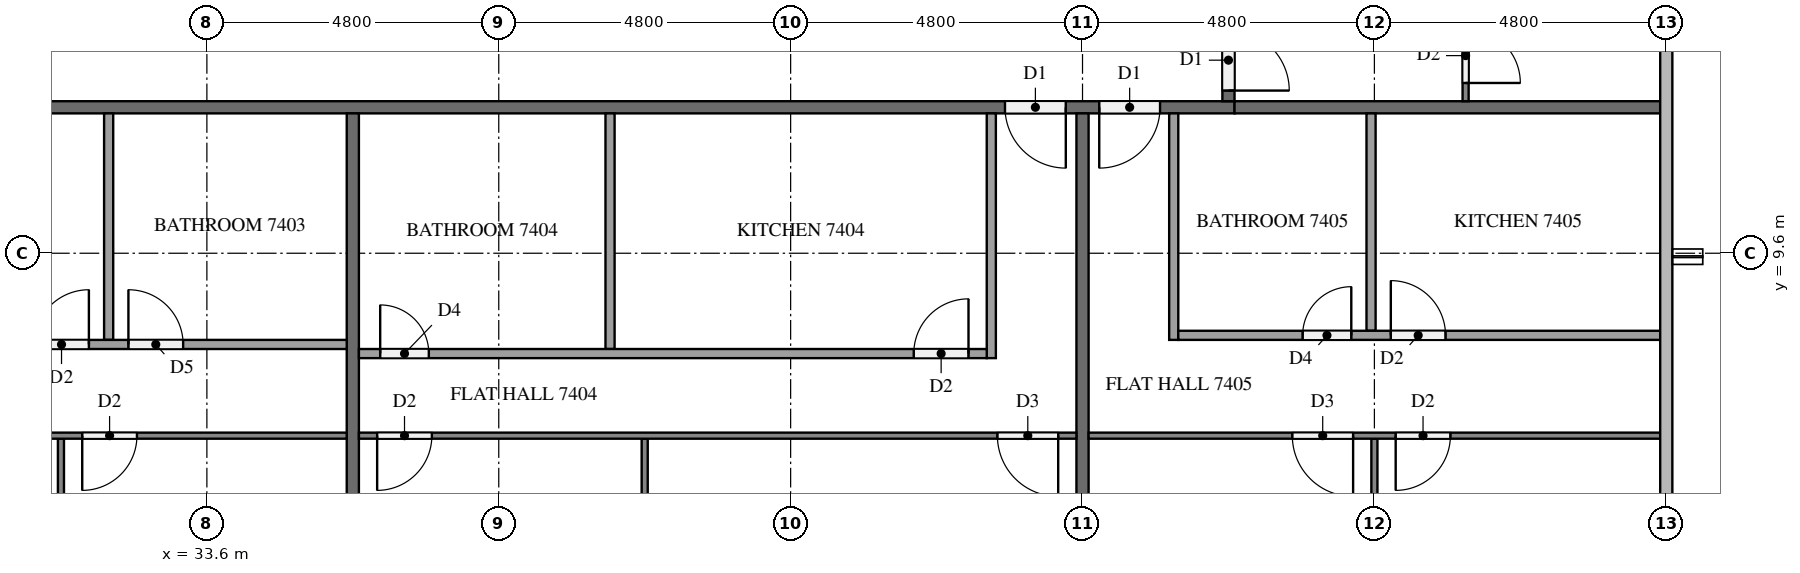
"""IFC4 building model, lengths in metres.
Left out: names, types, materials, properties, quantities, classifications, styles, units other than length and angle.
Written with IfcOpenShell. Run it as: python <this file> out.ifc"""

import sys

from ifc_helpers import new_model, si_unit, direction, frame, frame_2d, origin, place, context, subcontext, project, spatial, rectangle, extrude, element, fill, save


model = new_model("IFC4")
c1 = context("Model", 3, precision=1e-05, world=origin(), true_north=direction((0.0, 1.0)))
c2 = subcontext(c1, "Body", "Model", "MODEL_VIEW")
j1 = project(units=[si_unit("LENGTHUNIT", "METRE"), si_unit("PLANEANGLEUNIT", "RADIAN")], contexts=[c1])
p1 = place(None, origin())
s1 = spatial("IfcSite", under=j1, at=p1, CompositionType="ELEMENT")
p2 = place(p1, origin())
s2 = spatial("IfcBuilding", under=s1, at=p2, CompositionType="ELEMENT")
p3 = place(p2, frame((0.0, 0.0, 282.6)))
s3 = spatial("IfcBuildingStorey", under=s2, at=p3, CompositionType="ELEMENT", Elevation=282.6)
p4 = place(p3, frame((50.5, 12.0, 0.0), z_axis=(0.0, 0.0, 1.0), x_axis=(-1.0, 0.0, 0.0)))
e1 = element("IfcWall", 1, at=p4, inside=s3, PredefinedType="PARTITIONING", context=c2, shape_type="SweptSolid", body=[
    extrude(rectangle(XDim=38.6, YDim=0.2, at=frame_2d((19.3, 0.0))), origin(), (0.0, 0.0, 1.0), 3.2),
])
p5 = place(p4, frame((36.375, 0.0, 0.0)))
e2 = element("IfcOpeningElement", 2, at=p5, cuts=e1, PredefinedType="OPENING", context=c2, shape_type="SweptSolid", body=[
    extrude(rectangle(XDim=1.0, YDim=2.1, at=frame_2d((0.5, 1.05))), frame((0.0, 0.11, 0.0), z_axis=(0.0, -1.0, 0.0), x_axis=(1.0, 0.0, 0.0)), (0.0, 0.0, 1.0), 0.22),
])
p6 = place(p4, frame((29.175, 0.0, 0.0)))
e3 = element("IfcOpeningElement", 3, at=p6, cuts=e1, PredefinedType="OPENING", context=c2, shape_type="SweptSolid", body=[
    extrude(rectangle(XDim=1.0, YDim=2.1, at=frame_2d((0.5, 1.05))), frame((0.0, 0.11, 0.0), z_axis=(0.0, -1.0, 0.0), x_axis=(1.0, 0.0, 0.0)), (0.0, 0.0, 1.0), 0.22),
])
p7 = place(p4, frame((27.625, 0.0, 0.0)))
e4 = element("IfcOpeningElement", 4, at=p7, cuts=e1, PredefinedType="OPENING", context=c2, shape_type="SweptSolid", body=[
    extrude(rectangle(XDim=1.0, YDim=2.1, at=frame_2d((0.5, 1.05))), frame((0.0, 0.11, 0.0), z_axis=(0.0, -1.0, 0.0), x_axis=(1.0, 0.0, 0.0)), (0.0, 0.0, 1.0), 0.22),
])
p8 = place(p4, frame((2.775, 0.0, 0.0)))
e5 = element("IfcOpeningElement", 5, at=p8, cuts=e1, PredefinedType="OPENING", context=c2, shape_type="SweptSolid", body=[
    extrude(rectangle(XDim=1.0, YDim=2.1, at=frame_2d((0.5, 1.05))), frame((0.0, 0.11, 0.0), z_axis=(0.0, -1.0, 0.0), x_axis=(1.0, 0.0, 0.0)), (0.0, 0.0, 1.0), 0.22),
])
p9 = place(p4, frame((1.225, 0.0, 0.0)))
e6 = element("IfcOpeningElement", 6, at=p9, cuts=e1, PredefinedType="OPENING", context=c2, shape_type="SweptSolid", body=[
    extrude(rectangle(XDim=1.0, YDim=2.1, at=frame_2d((0.5, 1.05))), frame((0.0, 0.11, 0.0), z_axis=(0.0, -1.0, 0.0), x_axis=(1.0, 0.0, 0.0)), (0.0, 0.0, 1.0), 0.22),
])
p10 = place(p3, frame((50.4, 40.7, 0.0), z_axis=(0.0, 0.0, 1.0), x_axis=(0.0, -1.0, 0.0)))
e7 = element("IfcWall", 7, at=p10, inside=s3, PredefinedType="PARTITIONING", context=c2, shape_type="SweptSolid", body=[
    extrude(rectangle(XDim=28.6, YDim=0.2, at=frame_2d((14.3, 0.0))), origin(), (0.0, 0.0, 1.0), 3.2),
])
p11 = place(p10, frame((27.425, 0.0, 0.0)))
e8 = element("IfcOpeningElement", 8, at=p11, cuts=e7, PredefinedType="OPENING", context=c2, shape_type="SweptSolid", body=[
    extrude(rectangle(XDim=1.0, YDim=2.1, at=frame_2d((0.5, 1.05))), frame((0.0, 0.11, 0.0), z_axis=(0.0, -1.0, 0.0), x_axis=(1.0, 0.0, 0.0)), (0.0, 0.0, 1.0), 0.22),
])
p12 = place(p10, frame((13.025, 0.0, 0.0)))
e9 = element("IfcOpeningElement", 9, at=p12, cuts=e7, PredefinedType="OPENING", context=c2, shape_type="SweptSolid", body=[
    extrude(rectangle(XDim=1.0, YDim=2.1, at=frame_2d((0.5, 1.05))), frame((0.0, 0.11, 0.0), z_axis=(0.0, -1.0, 0.0), x_axis=(1.0, 0.0, 0.0)), (0.0, 0.0, 1.0), 0.22),
])
for number, where, z_axis, x_axis in (
    (10, (36.0, 11.9, 0.0), (0.0, 0.0, 1.0), (0.0, -1.0, 0.0)),
    (11, (48.0, 11.9, 0.0), (0.0, 0.0, 1.0), (0.0, -1.0, 0.0)),
):
    element("IfcWall", number, at=place(p3, frame(where, z_axis=z_axis, x_axis=x_axis)), inside=s3, PredefinedType="PARTITIONING", context=c2, shape_type="SweptSolid", body=[
        extrude(rectangle(XDim=11.8, YDim=0.2, at=frame_2d((5.9, 0.0))), origin(), (0.0, 0.0, 1.0), 3.2),
    ])
p13 = place(p3, frame((50.5, 12.0, 0.0), z_axis=(0.0, 0.0, 1.0), x_axis=(1.0, 0.0, 0.0)))
e12 = element("IfcWall", 12, at=p13, inside=s3, PredefinedType="PARTITIONING", context=c2, shape_type="SweptSolid", body=[
    extrude(rectangle(XDim=7.0, YDim=0.2, at=frame_2d((3.5, 0.0))), origin(), (0.0, 0.0, 1.0), 3.2),
])
p14 = place(p3, frame((31.2, 6.55, 0.0), z_axis=(0.0, 0.0, 1.0), x_axis=(0.0, -1.0, 0.0)))
e13 = element("IfcWall", 13, at=p14, inside=s3, PredefinedType="PARTITIONING", context=c2, shape_type="SweptSolid", body=[
    extrude(rectangle(XDim=6.45, YDim=0.1, at=frame_2d((3.225, 0.0))), origin(), (0.0, 0.0, 1.0), 3.2),
])
p15 = place(p3, frame((35.9, 6.6, 0.0), z_axis=(0.0, 0.0, 1.0), x_axis=(-1.0, 0.0, 0.0)))
e14 = element("IfcWall", 14, at=p15, inside=s3, PredefinedType="PARTITIONING", context=c2, shape_type="SweptSolid", body=[
    extrude(rectangle(XDim=14.2, YDim=0.1, at=frame_2d((7.1, 0.0))), origin(), (0.0, 0.0, 1.0), 3.2),
])
p16 = place(p15, frame((13.0, 0.0, 0.0)))
e15 = element("IfcOpeningElement", 15, at=p16, cuts=e14, PredefinedType="OPENING", context=c2, shape_type="SweptSolid", body=[
    extrude(rectangle(XDim=0.9, YDim=2.1, at=frame_2d((0.45, 1.05))), frame((0.0, 0.06, 0.0), z_axis=(0.0, -1.0, 0.0), x_axis=(1.0, 0.0, 0.0)), (0.0, 0.0, 1.0), 0.12),
])
p17 = place(p15, frame((5.05, 0.0, 0.0)))
e16 = element("IfcOpeningElement", 16, at=p17, cuts=e14, PredefinedType="OPENING", context=c2, shape_type="SweptSolid", body=[
    extrude(rectangle(XDim=1.0, YDim=2.1, at=frame_2d((0.5, 1.05))), frame((0.0, 0.06, 0.0), z_axis=(0.0, -1.0, 0.0), x_axis=(1.0, 0.0, 0.0)), (0.0, 0.0, 1.0), 0.12),
])
p18 = place(p15, frame((3.45, 0.0, 0.0)))
e17 = element("IfcOpeningElement", 17, at=p18, cuts=e14, PredefinedType="OPENING", context=c2, shape_type="SweptSolid", body=[
    extrude(rectangle(XDim=0.9, YDim=2.1, at=frame_2d((0.45, 1.05))), frame((0.0, 0.06, 0.0), z_axis=(0.0, -1.0, 0.0), x_axis=(1.0, 0.0, 0.0)), (0.0, 0.0, 1.0), 0.12),
])
p19 = place(p3, frame((31.985, 11.9, 0.0), z_axis=(0.0, 0.0, 1.0), x_axis=(0.0, -1.0, 0.0)))
e18 = element("IfcWall", 18, at=p19, inside=s3, PredefinedType="PARTITIONING", context=c2, shape_type="SweptSolid", body=[
    extrude(rectangle(XDim=3.725, YDim=0.15, at=frame_2d((1.862, 0.0))), origin(), (0.0, 0.0, 1.0), 3.2),
])
p20 = place(p3, frame((23.175, 8.1, 0.0), z_axis=(0.0, 0.0, 1.0), x_axis=(1.0, 0.0, 0.0)))
e19 = element("IfcWall", 19, at=p20, inside=s3, PredefinedType="PARTITIONING", context=c2, shape_type="SweptSolid", body=[
    extrude(rectangle(XDim=12.725, YDim=0.15, at=frame_2d((6.362, 0.0))), origin(), (0.0, 0.0, 1.0), 3.2),
])
p21 = place(p20, frame((0.3, 0.0, 0.0)))
e20 = element("IfcOpeningElement", 20, at=p21, cuts=e19, PredefinedType="OPENING", context=c2, shape_type="SweptSolid", body=[
    extrude(rectangle(XDim=0.8, YDim=2.1, at=frame_2d((0.4, 1.05))), frame((0.0, 0.085, 0.0), z_axis=(0.0, -1.0, 0.0), x_axis=(1.0, 0.0, 0.0)), (0.0, 0.0, 1.0), 0.17),
])
p22 = place(p20, frame((7.585, 0.0, 0.0)))
e21 = element("IfcOpeningElement", 21, at=p22, cuts=e19, PredefinedType="OPENING", context=c2, shape_type="SweptSolid", body=[
    extrude(rectangle(XDim=0.9, YDim=2.1, at=frame_2d((0.45, 1.05))), frame((0.0, 0.085, 0.0), z_axis=(0.0, -1.0, 0.0), x_axis=(1.0, 0.0, 0.0)), (0.0, 0.0, 1.0), 0.17),
])
p23 = place(p20, frame((9.135, 0.0, 0.0)))
e22 = element("IfcOpeningElement", 22, at=p23, cuts=e19, PredefinedType="OPENING", context=c2, shape_type="SweptSolid", body=[
    extrude(rectangle(XDim=0.9, YDim=2.1, at=frame_2d((0.45, 1.05))), frame((0.0, 0.085, 0.0), z_axis=(0.0, -1.0, 0.0), x_axis=(1.0, 0.0, 0.0)), (0.0, 0.0, 1.0), 0.17),
])
p24 = place(p3, frame((40.8, 6.55, 0.0), z_axis=(0.0, 0.0, 1.0), x_axis=(0.0, -1.0, 0.0)))
e23 = element("IfcWall", 23, at=p24, inside=s3, PredefinedType="PARTITIONING", context=c2, shape_type="SweptSolid", body=[
    extrude(rectangle(XDim=6.45, YDim=0.1, at=frame_2d((3.225, 0.0))), origin(), (0.0, 0.0, 1.0), 3.2),
])
p25 = place(p3, frame((47.9, 6.6, 0.0), z_axis=(0.0, 0.0, 1.0), x_axis=(-1.0, 0.0, 0.0)))
e24 = element("IfcWall", 24, at=p25, inside=s3, PredefinedType="PARTITIONING", context=c2, shape_type="SweptSolid", body=[
    extrude(rectangle(XDim=11.8, YDim=0.1, at=frame_2d((5.9, 0.0))), origin(), (0.0, 0.0, 1.0), 3.2),
])
p26 = place(p25, frame((0.3, 0.0, 0.0)))
e25 = element("IfcOpeningElement", 25, at=p26, cuts=e24, PredefinedType="OPENING", context=c2, shape_type="SweptSolid", body=[
    extrude(rectangle(XDim=1.0, YDim=2.1, at=frame_2d((0.5, 1.05))), frame((0.0, 0.06, 0.0), z_axis=(0.0, -1.0, 0.0), x_axis=(1.0, 0.0, 0.0)), (0.0, 0.0, 1.0), 0.12),
])
p27 = place(p25, frame((10.6, 0.0, 0.0)))
e26 = element("IfcOpeningElement", 26, at=p27, cuts=e24, PredefinedType="OPENING", context=c2, shape_type="SweptSolid", body=[
    extrude(rectangle(XDim=0.9, YDim=2.1, at=frame_2d((0.45, 1.05))), frame((0.0, 0.06, 0.0), z_axis=(0.0, -1.0, 0.0), x_axis=(1.0, 0.0, 0.0)), (0.0, 0.0, 1.0), 0.12),
])
p28 = place(p3, frame((40.23, 11.9, 0.0), z_axis=(0.0, 0.0, 1.0), x_axis=(0.0, -1.0, 0.0)))
e27 = element("IfcWall", 27, at=p28, inside=s3, PredefinedType="PARTITIONING", context=c2, shape_type="SweptSolid", body=[
    extrude(rectangle(XDim=3.875, YDim=0.15, at=frame_2d((1.938, 0.0))), origin(), (0.0, 0.0, 1.0), 3.2),
])
p29 = place(p3, frame((46.5, 11.9, 0.0), z_axis=(0.0, 0.0, 1.0), x_axis=(0.0, -1.0, 0.0)))
e28 = element("IfcWall", 28, at=p29, inside=s3, PredefinedType="PARTITIONING", context=c2, shape_type="SweptSolid", body=[
    extrude(rectangle(XDim=4.025, YDim=0.15, at=frame_2d((2.012, 0.0))), origin(), (0.0, 0.0, 1.0), 3.2),
])
p30 = place(p3, frame((36.1, 7.95, 0.0), z_axis=(0.0, 0.0, 1.0), x_axis=(1.0, 0.0, 0.0)))
e29 = element("IfcWall", 29, at=p30, inside=s3, PredefinedType="PARTITIONING", context=c2, shape_type="SweptSolid", body=[
    extrude(rectangle(XDim=10.325, YDim=0.15, at=frame_2d((5.163, 0.0))), origin(), (0.0, 0.0, 1.0), 3.2),
])
p31 = place(p30, frame((9.125, 0.0, 0.0)))
e30 = element("IfcOpeningElement", 30, at=p31, cuts=e29, PredefinedType="OPENING", context=c2, shape_type="SweptSolid", body=[
    extrude(rectangle(XDim=0.9, YDim=2.1, at=frame_2d((0.45, 1.05))), frame((0.0, 0.085, 0.0), z_axis=(0.0, -1.0, 0.0), x_axis=(1.0, 0.0, 0.0)), (0.0, 0.0, 1.0), 0.17),
])
p32 = place(p30, frame((0.35, 0.0, 0.0)))
e31 = element("IfcOpeningElement", 31, at=p32, cuts=e29, PredefinedType="OPENING", context=c2, shape_type="SweptSolid", body=[
    extrude(rectangle(XDim=0.8, YDim=2.1, at=frame_2d((0.4, 1.05))), frame((0.0, 0.085, 0.0), z_axis=(0.0, -1.0, 0.0), x_axis=(1.0, 0.0, 0.0)), (0.0, 0.0, 1.0), 0.17),
])
p33 = place(p3, frame((52.8, 6.55, 0.0), z_axis=(0.0, 0.0, 1.0), x_axis=(0.0, -1.0, 0.0)))
e32 = element("IfcWall", 32, at=p33, inside=s3, PredefinedType="PARTITIONING", context=c2, shape_type="SweptSolid", body=[
    extrude(rectangle(XDim=6.25, YDim=0.1, at=frame_2d((3.125, 0.0))), origin(), (0.0, 0.0, 1.0), 3.2),
])
p34 = place(p3, frame((57.5, 6.6, 0.0), z_axis=(0.0, 0.0, 1.0), x_axis=(-1.0, 0.0, 0.0)))
e33 = element("IfcWall", 33, at=p34, inside=s3, PredefinedType="PARTITIONING", context=c2, shape_type="SweptSolid", body=[
    extrude(rectangle(XDim=9.4, YDim=0.1, at=frame_2d((4.7, 0.0))), origin(), (0.0, 0.0, 1.0), 3.2),
])
p35 = place(p34, frame((5.05, 0.0, 0.0)))
e34 = element("IfcOpeningElement", 34, at=p35, cuts=e33, PredefinedType="OPENING", context=c2, shape_type="SweptSolid", body=[
    extrude(rectangle(XDim=1.0, YDim=2.1, at=frame_2d((0.5, 1.05))), frame((0.0, 0.06, 0.0), z_axis=(0.0, -1.0, 0.0), x_axis=(1.0, 0.0, 0.0)), (0.0, 0.0, 1.0), 0.12),
])
p36 = place(p34, frame((3.45, 0.0, 0.0)))
e35 = element("IfcOpeningElement", 35, at=p36, cuts=e33, PredefinedType="OPENING", context=c2, shape_type="SweptSolid", body=[
    extrude(rectangle(XDim=0.9, YDim=2.1, at=frame_2d((0.45, 1.05))), frame((0.0, 0.06, 0.0), z_axis=(0.0, -1.0, 0.0), x_axis=(1.0, 0.0, 0.0)), (0.0, 0.0, 1.0), 0.12),
])
p37 = place(p3, frame((52.745, 11.9, 0.0), z_axis=(0.0, 0.0, 1.0), x_axis=(0.0, -1.0, 0.0)))
e36 = element("IfcWall", 36, at=p37, inside=s3, PredefinedType="PARTITIONING", context=c2, shape_type="SweptSolid", body=[
    extrude(rectangle(XDim=3.575, YDim=0.15, at=frame_2d((1.788, 0.0))), origin(), (0.0, 0.0, 1.0), 3.2),
])
p38 = place(p3, frame((49.5, 11.9, 0.0), z_axis=(0.0, 0.0, 1.0), x_axis=(0.0, -1.0, 0.0)))
e37 = element("IfcWall", 37, at=p38, inside=s3, PredefinedType="PARTITIONING", context=c2, shape_type="SweptSolid", body=[
    extrude(rectangle(XDim=3.725, YDim=0.15, at=frame_2d((1.862, 0.0))), origin(), (0.0, 0.0, 1.0), 3.2),
])
p39 = place(p3, frame((49.575, 8.25, 0.0), z_axis=(0.0, 0.0, 1.0), x_axis=(1.0, 0.0, 0.0)))
e38 = element("IfcWall", 38, at=p39, inside=s3, PredefinedType="PARTITIONING", context=c2, shape_type="SweptSolid", body=[
    extrude(rectangle(XDim=7.925, YDim=0.15, at=frame_2d((3.962, 0.0))), origin(), (0.0, 0.0, 1.0), 3.2),
])
p40 = place(p39, frame((2.045, 0.0, 0.0)))
e39 = element("IfcOpeningElement", 39, at=p40, cuts=e38, PredefinedType="OPENING", context=c2, shape_type="SweptSolid", body=[
    extrude(rectangle(XDim=0.8, YDim=2.1, at=frame_2d((0.4, 1.05))), frame((0.0, 0.085, 0.0), z_axis=(0.0, -1.0, 0.0), x_axis=(1.0, 0.0, 0.0)), (0.0, 0.0, 1.0), 0.17),
])
p41 = place(p39, frame((3.495, 0.0, 0.0)))
e40 = element("IfcOpeningElement", 40, at=p41, cuts=e38, PredefinedType="OPENING", context=c2, shape_type="SweptSolid", body=[
    extrude(rectangle(XDim=0.9, YDim=2.1, at=frame_2d((0.45, 1.05))), frame((0.0, 0.085, 0.0), z_axis=(0.0, -1.0, 0.0), x_axis=(1.0, 0.0, 0.0)), (0.0, 0.0, 1.0), 0.17),
])
p42 = place(p3, frame((54.3, 26.3, 0.0), z_axis=(0.0, 0.0, 1.0), x_axis=(0.0, -1.0, 0.0)))
e41 = element("IfcWall", 41, at=p42, inside=s3, PredefinedType="PARTITIONING", context=c2, shape_type="SweptSolid", body=[
    extrude(rectangle(XDim=14.2, YDim=0.1, at=frame_2d((7.1, 0.0))), origin(), (0.0, 0.0, 1.0), 3.2),
])
p43 = place(p42, frame((13.0, 0.0, 0.0)))
e42 = element("IfcOpeningElement", 42, at=p43, cuts=e41, PredefinedType="OPENING", context=c2, shape_type="SweptSolid", body=[
    extrude(rectangle(XDim=0.9, YDim=2.1, at=frame_2d((0.45, 1.05))), frame((0.0, 0.06, 0.0), z_axis=(0.0, -1.0, 0.0), x_axis=(1.0, 0.0, 0.0)), (0.0, 0.0, 1.0), 0.12),
])
p44 = place(p42, frame((5.05, 0.0, 0.0)))
e43 = element("IfcOpeningElement", 43, at=p44, cuts=e41, PredefinedType="OPENING", context=c2, shape_type="SweptSolid", body=[
    extrude(rectangle(XDim=0.9, YDim=2.1, at=frame_2d((0.45, 1.05))), frame((0.0, 0.06, 0.0), z_axis=(0.0, -1.0, 0.0), x_axis=(1.0, 0.0, 0.0)), (0.0, 0.0, 1.0), 0.12),
])
p45 = place(p42, frame((3.35, 0.0, 0.0)))
e44 = element("IfcOpeningElement", 44, at=p45, cuts=e41, PredefinedType="OPENING", context=c2, shape_type="SweptSolid", body=[
    extrude(rectangle(XDim=1.0, YDim=2.1, at=frame_2d((0.5, 1.05))), frame((0.0, 0.06, 0.0), z_axis=(0.0, -1.0, 0.0), x_axis=(1.0, 0.0, 0.0)), (0.0, 0.0, 1.0), 0.12),
])
p46 = place(p8, origin())
e45 = element("IfcDoor", 45, at=p46, inside=s3, OperationType="SINGLE_SWING_LEFT", PredefinedType="DOOR", context=c2, shape_type="SweptSolid", body=[
    extrude(rectangle(XDim=1.0, YDim=2.1, at=frame_2d((0.5, 1.05))), frame((0.0, 0.025, 0.0), z_axis=(0.0, -1.0, 0.0), x_axis=(1.0, 0.0, 0.0)), (0.0, 0.0, 1.0), 0.05),
])
fill(e5, e45)
p47 = place(p9, origin())
e46 = element("IfcDoor", 46, at=p47, inside=s3, OperationType="SINGLE_SWING_RIGHT", PredefinedType="DOOR", context=c2, shape_type="SweptSolid", body=[
    extrude(rectangle(XDim=1.0, YDim=2.1, at=frame_2d((0.5, 1.05))), frame((0.0, 0.025, 0.0), z_axis=(0.0, -1.0, 0.0), x_axis=(1.0, 0.0, 0.0)), (0.0, 0.0, 1.0), 0.05),
])
fill(e6, e46)
p48 = place(p11, origin())
e47 = element("IfcDoor", 47, at=p48, inside=s3, OperationType="SINGLE_SWING_RIGHT", PredefinedType="DOOR", context=c2, shape_type="SweptSolid", body=[
    extrude(rectangle(XDim=1.0, YDim=2.1, at=frame_2d((0.5, 1.05))), frame((0.0, 0.025, 0.0), z_axis=(0.0, -1.0, 0.0), x_axis=(1.0, 0.0, 0.0)), (0.0, 0.0, 1.0), 0.05),
])
fill(e8, e47)
p49 = place(p18, origin())
e48 = element("IfcDoor", 48, at=p49, inside=s3, OperationType="SINGLE_SWING_RIGHT", PredefinedType="DOOR", context=c2, shape_type="SweptSolid", body=[
    extrude(rectangle(XDim=0.9, YDim=2.1, at=frame_2d((0.45, 1.05))), frame((0.0, 0.025, 0.0), z_axis=(0.0, -1.0, 0.0), x_axis=(1.0, 0.0, 0.0)), (0.0, 0.0, 1.0), 0.05),
])
fill(e17, e48)
p50 = place(p22, origin())
e49 = element("IfcDoor", 49, at=p50, inside=s3, OperationType="SINGLE_SWING_RIGHT", PredefinedType="DOOR", context=c2, shape_type="SweptSolid", body=[
    extrude(rectangle(XDim=0.9, YDim=2.1, at=frame_2d((0.45, 1.05))), frame((0.0, 0.025, 0.0), z_axis=(0.0, -1.0, 0.0), x_axis=(1.0, 0.0, 0.0)), (0.0, 0.0, 1.0), 0.05),
])
fill(e21, e49)
p51 = place(p23, origin())
e50 = element("IfcDoor", 50, at=p51, inside=s3, OperationType="SINGLE_SWING_LEFT", PredefinedType="DOOR", context=c2, shape_type="SweptSolid", body=[
    extrude(rectangle(XDim=0.9, YDim=2.1, at=frame_2d((0.45, 1.05))), frame((0.0, 0.025, 0.0), z_axis=(0.0, -1.0, 0.0), x_axis=(1.0, 0.0, 0.0)), (0.0, 0.0, 1.0), 0.05),
])
fill(e22, e50)
p52 = place(p26, origin())
e51 = element("IfcDoor", 51, at=p52, inside=s3, OperationType="SINGLE_SWING_LEFT", PredefinedType="DOOR", context=c2, shape_type="SweptSolid", body=[
    extrude(rectangle(XDim=1.0, YDim=2.1, at=frame_2d((0.5, 1.05))), frame((0.0, 0.025, 0.0), z_axis=(0.0, -1.0, 0.0), x_axis=(1.0, 0.0, 0.0)), (0.0, 0.0, 1.0), 0.05),
])
fill(e25, e51)
p53 = place(p27, origin())
e52 = element("IfcDoor", 52, at=p53, inside=s3, OperationType="SINGLE_SWING_RIGHT", PredefinedType="DOOR", context=c2, shape_type="SweptSolid", body=[
    extrude(rectangle(XDim=0.9, YDim=2.1, at=frame_2d((0.45, 1.05))), frame((0.0, 0.025, 0.0), z_axis=(0.0, -1.0, 0.0), x_axis=(1.0, 0.0, 0.0)), (0.0, 0.0, 1.0), 0.05),
])
fill(e26, e52)
p54 = place(p31, origin())
e53 = element("IfcDoor", 53, at=p54, inside=s3, OperationType="SINGLE_SWING_RIGHT", PredefinedType="DOOR", context=c2, shape_type="SweptSolid", body=[
    extrude(rectangle(XDim=0.9, YDim=2.1, at=frame_2d((0.45, 1.05))), frame((0.0, 0.025, 0.0), z_axis=(0.0, -1.0, 0.0), x_axis=(1.0, 0.0, 0.0)), (0.0, 0.0, 1.0), 0.05),
])
fill(e30, e53)
p55 = place(p32, origin())
e54 = element("IfcDoor", 54, at=p55, inside=s3, OperationType="SINGLE_SWING_LEFT", PredefinedType="DOOR", context=c2, shape_type="SweptSolid", body=[
    extrude(rectangle(XDim=0.8, YDim=2.1, at=frame_2d((0.4, 1.05))), frame((0.0, 0.025, 0.0), z_axis=(0.0, -1.0, 0.0), x_axis=(1.0, 0.0, 0.0)), (0.0, 0.0, 1.0), 0.05),
])
fill(e31, e54)
p56 = place(p35, origin())
e55 = element("IfcDoor", 55, at=p56, inside=s3, OperationType="SINGLE_SWING_LEFT", PredefinedType="DOOR", context=c2, shape_type="SweptSolid", body=[
    extrude(rectangle(XDim=1.0, YDim=2.1, at=frame_2d((0.5, 1.05))), frame((0.0, 0.025, 0.0), z_axis=(0.0, -1.0, 0.0), x_axis=(1.0, 0.0, 0.0)), (0.0, 0.0, 1.0), 0.05),
])
fill(e34, e55)
p57 = place(p36, origin())
e56 = element("IfcDoor", 56, at=p57, inside=s3, OperationType="SINGLE_SWING_RIGHT", PredefinedType="DOOR", context=c2, shape_type="SweptSolid", body=[
    extrude(rectangle(XDim=0.9, YDim=2.1, at=frame_2d((0.45, 1.05))), frame((0.0, 0.025, 0.0), z_axis=(0.0, -1.0, 0.0), x_axis=(1.0, 0.0, 0.0)), (0.0, 0.0, 1.0), 0.05),
])
fill(e35, e56)
p58 = place(p40, origin())
e57 = element("IfcDoor", 57, at=p58, inside=s3, OperationType="SINGLE_SWING_RIGHT", PredefinedType="DOOR", context=c2, shape_type="SweptSolid", body=[
    extrude(rectangle(XDim=0.8, YDim=2.1, at=frame_2d((0.4, 1.05))), frame((0.0, 0.025, 0.0), z_axis=(0.0, -1.0, 0.0), x_axis=(1.0, 0.0, 0.0)), (0.0, 0.0, 1.0), 0.05),
])
fill(e39, e57)
p59 = place(p41, origin())
e58 = element("IfcDoor", 58, at=p59, inside=s3, OperationType="SINGLE_SWING_LEFT", PredefinedType="DOOR", context=c2, shape_type="SweptSolid", body=[
    extrude(rectangle(XDim=0.9, YDim=2.1, at=frame_2d((0.45, 1.05))), frame((0.0, 0.025, 0.0), z_axis=(0.0, -1.0, 0.0), x_axis=(1.0, 0.0, 0.0)), (0.0, 0.0, 1.0), 0.05),
])
fill(e40, e58)
p60 = place(p43, origin())
e59 = element("IfcDoor", 59, at=p60, inside=s3, OperationType="SINGLE_SWING_RIGHT", PredefinedType="DOOR", context=c2, shape_type="SweptSolid", body=[
    extrude(rectangle(XDim=0.9, YDim=2.1, at=frame_2d((0.45, 1.05))), frame((0.0, 0.025, 0.0), z_axis=(0.0, -1.0, 0.0), x_axis=(1.0, 0.0, 0.0)), (0.0, 0.0, 1.0), 0.05),
])
fill(e42, e59)
save(model, sys.argv[1])
